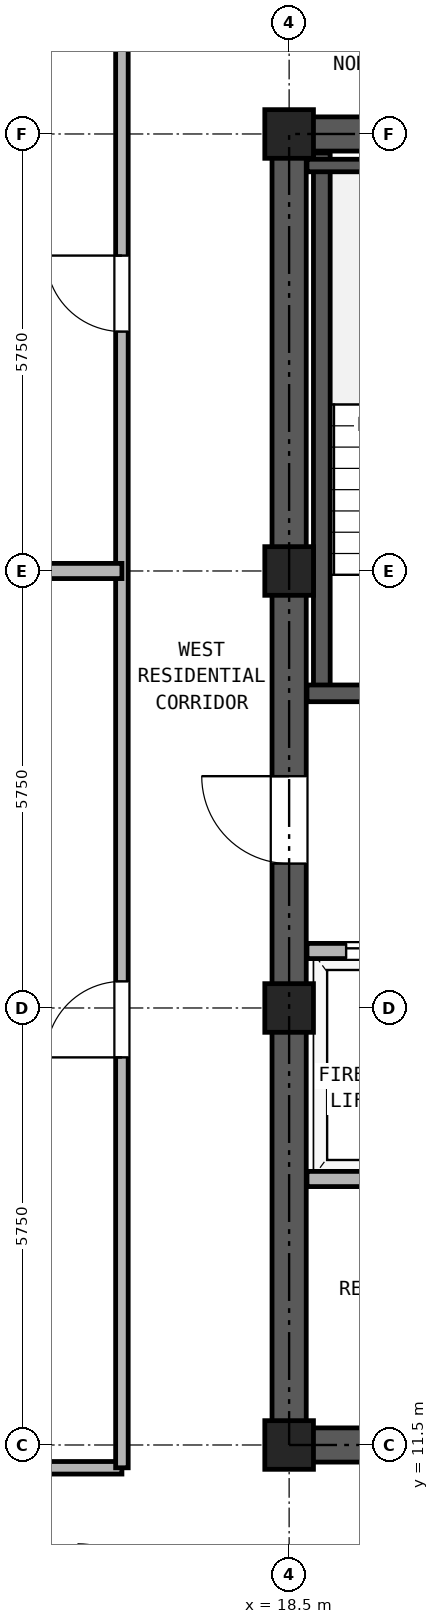
"""IFC4 building model, lengths in metres.
Left out: names, types, materials, properties, quantities, classifications, styles, units other than length and angle.
Written with IfcOpenShell. Run it as: python <this file> out.ifc"""

import sys

from ifc_helpers import new_model, si_unit, direction, frame, frame_2d, origin, origin_2d, place, context, subcontext, project, spatial, rectangle, hollow_rectangle, extrude, source, transform, mapped, element, fill, save


model = new_model("IFC4")
c1 = context("Model", 3, precision=1e-05, world=origin(), true_north=direction((0.0, 1.0)))
c2 = subcontext(c1, "Body", "Model", "MODEL_VIEW")
j1 = project(units=[si_unit("LENGTHUNIT", "METRE"), si_unit("PLANEANGLEUNIT", "RADIAN")], contexts=[c1])
p1 = place(None, origin())
s1 = spatial("IfcSite", under=j1, at=p1, CompositionType="ELEMENT")
p2 = place(p1, origin())
s2 = spatial("IfcBuilding", under=s1, at=p2, CompositionType="ELEMENT")
p3 = place(p2, frame((0.0, 0.0, 184.9)))
s3 = spatial("IfcBuildingStorey", under=s2, at=p3, CompositionType="ELEMENT", Elevation=184.9)
m1 = source(origin(), c2, "Body", "SweptSolid", [
    extrude(hollow_rectangle(XDim=0.64, YDim=0.64, WallThickness=0.035, at=origin_2d()), origin(), (0.0, 0.0, 1.0), 2.84),
])
for number, where, z_axis, x_axis in (
    (1, (18.5, 11.5, 0.0), (0.0, 0.0, 1.0), (1.0, 0.0, 0.0)),
    (2, (18.5, 17.25, 0.0), (0.0, 0.0, 1.0), (1.0, 0.0, 0.0)),
    (3, (18.5, 23.0, 0.0), (0.0, 0.0, 1.0), (1.0, 0.0, 0.0)),
    (4, (18.5, 28.75, 0.0), (0.0, 0.0, 1.0), (1.0, 0.0, 0.0)),
):
    element("IfcColumn", number, at=place(p3, frame(where, z_axis=z_axis, x_axis=x_axis)), inside=s3, PredefinedType="COLUMN", context=c2, shape_type="MappedRepresentation", body=[
        mapped(m1, transform((0.0, 0.0, 0.0), x_axis=(1.0, 0.0, 0.0), y_axis=(0.0, 1.0, 0.0), z_axis=(0.0, 0.0, 1.0), scale=1.0)),
    ])
p4 = place(p3, frame((18.275, 11.5, 0.0), z_axis=(0.0, 0.0, 1.0), x_axis=(1.0, 0.0, 0.0)))
e5 = element("IfcWall", 5, at=p4, inside=s3, PredefinedType="SHEAR", context=c2, shape_type="SweptSolid", body=[
    extrude(rectangle(XDim=10.45, YDim=0.45, at=frame_2d((5.225, 0.0))), origin(), (0.0, 0.0, 1.0), 2.84),
])
p5 = place(p4, frame((1.825, 0.0, 0.0)))
e6 = element("IfcOpeningElement", 6, at=p5, cuts=e5, PredefinedType="OPENING", context=c2, shape_type="SweptSolid", body=[
    extrude(rectangle(XDim=0.95, YDim=2.15, at=frame_2d((0.475, 1.075))), frame((0.0, 0.235, 0.0), z_axis=(0.0, -1.0, 0.0), x_axis=(1.0, 0.0, 0.0)), (0.0, 0.0, 1.0), 0.47),
])
p6 = place(p4, frame((5.325, 0.0, 0.0)))
e7 = element("IfcOpeningElement", 7, at=p6, cuts=e5, PredefinedType="OPENING", context=c2, shape_type="SweptSolid", body=[
    extrude(rectangle(XDim=0.95, YDim=2.15, at=frame_2d((0.475, 1.075))), frame((0.0, 0.235, 0.0), z_axis=(0.0, -1.0, 0.0), x_axis=(1.0, 0.0, 0.0)), (0.0, 0.0, 1.0), 0.47),
])
p7 = place(p4, frame((8.225, 0.0, 0.0)))
e8 = element("IfcOpeningElement", 8, at=p7, cuts=e5, PredefinedType="OPENING", context=c2, shape_type="SweptSolid", body=[
    extrude(rectangle(XDim=1.1, YDim=2.25, at=frame_2d((0.55, 1.125))), frame((0.0, 0.235, 0.0), z_axis=(0.0, -1.0, 0.0), x_axis=(1.0, 0.0, 0.0)), (0.0, 0.0, 1.0), 0.47),
])
p8 = place(p3, frame((18.275, 28.75, 0.0), z_axis=(0.0, 0.0, 1.0), x_axis=(1.0, 0.0, 0.0)))
e9 = element("IfcWall", 9, at=p8, inside=s3, PredefinedType="SHEAR", context=c2, shape_type="SweptSolid", body=[
    extrude(rectangle(XDim=10.45, YDim=0.45, at=frame_2d((5.225, 0.0))), origin(), (0.0, 0.0, 1.0), 2.84),
])
p9 = place(p8, frame((4.105, 0.0, 0.0)))
e10 = element("IfcOpeningElement", 10, at=p9, cuts=e9, PredefinedType="OPENING", context=c2, shape_type="SweptSolid", body=[
    extrude(rectangle(XDim=0.9, YDim=2.05, at=frame_2d((0.45, 1.025))), frame((0.0, 0.235, 0.0), z_axis=(0.0, -1.0, 0.0), x_axis=(1.0, 0.0, 0.0)), (0.0, 0.0, 1.0), 0.47),
])
p10 = place(p8, frame((5.645, 0.0, 0.0)))
e11 = element("IfcOpeningElement", 11, at=p10, cuts=e9, PredefinedType="OPENING", context=c2, shape_type="SweptSolid", body=[
    extrude(rectangle(XDim=0.9, YDim=2.05, at=frame_2d((0.45, 1.025))), frame((0.0, 0.235, 0.0), z_axis=(0.0, -1.0, 0.0), x_axis=(1.0, 0.0, 0.0)), (0.0, 0.0, 1.0), 0.47),
])
p11 = place(p3, frame((18.5, 11.725, 0.0), z_axis=(0.0, 0.0, 1.0), x_axis=(0.0, 1.0, 0.0)))
e12 = element("IfcWall", 12, at=p11, inside=s3, PredefinedType="SHEAR", context=c2, shape_type="SweptSolid", body=[
    extrude(rectangle(XDim=16.8, YDim=0.45, at=frame_2d((8.4, 0.0))), origin(), (0.0, 0.0, 1.0), 2.84),
])
p12 = place(p11, frame((7.425, 0.0, 0.0)))
e13 = element("IfcOpeningElement", 13, at=p12, cuts=e12, PredefinedType="OPENING", context=c2, shape_type="SweptSolid", body=[
    extrude(rectangle(XDim=1.15, YDim=2.2, at=frame_2d((0.575, 1.1))), frame((0.0, 0.235, 0.0), z_axis=(0.0, -1.0, 0.0), x_axis=(1.0, 0.0, 0.0)), (0.0, 0.0, 1.0), 0.47),
])
p13 = place(p3, frame((18.93, 21.39, 0.0), z_axis=(0.0, 0.0, 1.0), x_axis=(0.0, 1.0, 0.0)))
e14 = element("IfcWall", 14, at=p13, inside=s3, PredefinedType="SOLIDWALL", context=c2, shape_type="SweptSolid", body=[
    extrude(rectangle(XDim=7.11, YDim=0.22, at=frame_2d((3.555, 0.0))), origin(), (0.0, 0.0, 1.0), 2.84),
])
p14 = place(p3, frame((18.735, 28.335, 0.0), z_axis=(0.0, 0.0, 1.0), x_axis=(1.0, 0.0, 0.0)))
e15 = element("IfcWall", 15, at=p14, inside=s3, PredefinedType="PARTITIONING", context=c2, shape_type="SweptSolid", body=[
    extrude(rectangle(XDim=3.375, YDim=0.165, at=frame_2d((1.688, 0.0))), origin(), (0.0, 0.0, 1.0), 2.84),
])
p15 = place(p3, frame((18.735, 21.39, 0.0), z_axis=(0.0, 0.0, 1.0), x_axis=(1.0, 0.0, 0.0)))
e16 = element("IfcWall", 16, at=p15, inside=s3, PredefinedType="SOLIDWALL", context=c2, shape_type="SweptSolid", body=[
    extrude(rectangle(XDim=6.395, YDim=0.22, at=frame_2d((3.197, 0.0))), origin(), (0.0, 0.0, 1.0), 2.84),
])
p16 = place(p15, frame((1.115, 0.0, 0.0)))
e17 = element("IfcOpeningElement", 17, at=p16, cuts=e16, PredefinedType="OPENING", context=c2, shape_type="SweptSolid", body=[
    extrude(rectangle(XDim=1.15, YDim=2.2, at=frame_2d((0.575, 1.1))), frame((0.0, 0.12, 0.0), z_axis=(0.0, -1.0, 0.0), x_axis=(1.0, 0.0, 0.0)), (0.0, 0.0, 1.0), 0.24),
])
p17 = place(p15, frame((4.845, 0.0, 0.0)))
e18 = element("IfcOpeningElement", 18, at=p17, cuts=e16, PredefinedType="OPENING", context=c2, shape_type="SweptSolid", body=[
    extrude(rectangle(XDim=1.1, YDim=2.25, at=frame_2d((0.55, 1.125))), frame((0.0, 0.12, 0.0), z_axis=(0.0, -1.0, 0.0), x_axis=(1.0, 0.0, 0.0)), (0.0, 0.0, 1.0), 0.24),
])
p18 = place(p3, frame((18.735, 18.0, 0.0), z_axis=(0.0, 0.0, 1.0), x_axis=(1.0, 0.0, 0.0)))
e19 = element("IfcWall", 19, at=p18, inside=s3, PredefinedType="PARTITIONING", context=c2, shape_type="SweptSolid", body=[
    extrude(rectangle(XDim=9.53, YDim=0.2, at=frame_2d((4.765, 0.0))), origin(), (0.0, 0.0, 1.0), 2.84),
])
p19 = place(p18, frame((0.515, 0.0, 0.0)))
e20 = element("IfcOpeningElement", 20, at=p19, cuts=e19, PredefinedType="OPENING", context=c2, shape_type="SweptSolid", body=[
    extrude(rectangle(XDim=1.3, YDim=2.3, at=frame_2d((0.65, 1.15))), frame((0.0, 0.11, 0.0), z_axis=(0.0, -1.0, 0.0), x_axis=(1.0, 0.0, 0.0)), (0.0, 0.0, 1.0), 0.22),
])
p20 = place(p18, frame((2.615, 0.0, 0.0)))
e21 = element("IfcOpeningElement", 21, at=p20, cuts=e19, PredefinedType="OPENING", context=c2, shape_type="SweptSolid", body=[
    extrude(rectangle(XDim=1.3, YDim=2.3, at=frame_2d((0.65, 1.15))), frame((0.0, 0.11, 0.0), z_axis=(0.0, -1.0, 0.0), x_axis=(1.0, 0.0, 0.0)), (0.0, 0.0, 1.0), 0.22),
])
p21 = place(p18, frame((7.115, 0.0, 0.0)))
e22 = element("IfcOpeningElement", 22, at=p21, cuts=e19, PredefinedType="OPENING", context=c2, shape_type="SweptSolid", body=[
    extrude(rectangle(XDim=1.0, YDim=2.15, at=frame_2d((0.5, 1.075))), frame((0.0, 0.11, 0.0), z_axis=(0.0, -1.0, 0.0), x_axis=(1.0, 0.0, 0.0)), (0.0, 0.0, 1.0), 0.22),
])
p22 = place(p3, frame((18.735, 15.0, 0.0), z_axis=(0.0, 0.0, 1.0), x_axis=(1.0, 0.0, 0.0)))
e23 = element("IfcWall", 23, at=p22, inside=s3, PredefinedType="PARTITIONING", context=c2, shape_type="SweptSolid", body=[
    extrude(rectangle(XDim=9.53, YDim=0.2, at=frame_2d((4.765, 0.0))), origin(), (0.0, 0.0, 1.0), 2.84),
])
p23 = place(p3, frame((7.6, 11.2, 0.0), z_axis=(0.0, 0.0, 1.0), x_axis=(1.0, 0.0, 0.0)))
e24 = element("IfcWall", 24, at=p23, inside=s3, PredefinedType="PARTITIONING", context=c2, shape_type="SweptSolid", body=[
    extrude(rectangle(XDim=8.7, YDim=0.165, at=frame_2d((4.35, 0.0))), origin(), (0.0, 0.0, 1.0), 2.84),
])
p24 = place(p3, frame((16.3, 11.2, 0.0), z_axis=(0.0, 0.0, 1.0), x_axis=(0.0, 1.0, 0.0)))
e25 = element("IfcWall", 25, at=p24, inside=s3, PredefinedType="PARTITIONING", context=c2, shape_type="SweptSolid", body=[
    extrude(rectangle(XDim=23.94, YDim=0.165, at=frame_2d((11.97, 0.0))), origin(), (0.0, 0.0, 1.0), 2.84),
])
p25 = place(p24, frame((5.4, 0.0, 0.0)))
e26 = element("IfcOpeningElement", 26, at=p25, cuts=e25, PredefinedType="OPENING", context=c2, shape_type="SweptSolid", body=[
    extrude(rectangle(XDim=1.0, YDim=2.15, at=frame_2d((0.5, 1.075))), frame((0.0, 0.093, 0.0), z_axis=(0.0, -1.0, 0.0), x_axis=(1.0, 0.0, 0.0)), (0.0, 0.0, 1.0), 0.185),
])
p26 = place(p24, frame((14.95, 0.0, 0.0)))
e27 = element("IfcOpeningElement", 27, at=p26, cuts=e25, PredefinedType="OPENING", context=c2, shape_type="SweptSolid", body=[
    extrude(rectangle(XDim=1.0, YDim=2.15, at=frame_2d((0.5, 1.075))), frame((0.0, 0.093, 0.0), z_axis=(0.0, -1.0, 0.0), x_axis=(1.0, 0.0, 0.0)), (0.0, 0.0, 1.0), 0.185),
])
p27 = place(p3, frame((0.16, 23.0, 0.0), z_axis=(0.0, 0.0, 1.0), x_axis=(1.0, 0.0, 0.0)))
e28 = element("IfcWall", 28, at=p27, inside=s3, PredefinedType="PARTITIONING", context=c2, shape_type="SweptSolid", body=[
    extrude(rectangle(XDim=16.14, YDim=0.2, at=frame_2d((8.07, 0.0))), origin(), (0.0, 0.0, 1.0), 2.213),
])
p28 = place(p19, origin())
e29 = element("IfcDoor", 29, at=p28, inside=s3, OperationType="DOUBLE_DOOR_SLIDING", PredefinedType="DOOR", context=c2, shape_type="SweptSolid", body=[
    extrude(rectangle(XDim=1.3, YDim=2.3, at=frame_2d((0.65, 1.15))), frame((0.0, 0.025, 0.0), z_axis=(0.0, -1.0, 0.0), x_axis=(1.0, 0.0, 0.0)), (0.0, 0.0, 1.0), 0.05),
])
fill(e20, e29)
p29 = place(p12, frame((1.15, 0.0, 0.0), z_axis=(0.0, 0.0, 1.0), x_axis=(-1.0, 0.0, 0.0)))
e30 = element("IfcDoor", 30, at=p29, inside=s3, OperationType="SINGLE_SWING_RIGHT", PredefinedType="DOOR", context=c2, shape_type="SweptSolid", body=[
    extrude(rectangle(XDim=1.15, YDim=2.2, at=frame_2d((0.575, 1.1))), frame((0.0, 0.025, 0.0), z_axis=(0.0, -1.0, 0.0), x_axis=(1.0, 0.0, 0.0)), (0.0, 0.0, 1.0), 0.05),
])
fill(e13, e30)
p30 = place(p25, origin())
e31 = element("IfcDoor", 31, at=p30, inside=s3, OperationType="SINGLE_SWING_LEFT", PredefinedType="DOOR", context=c2, shape_type="SweptSolid", body=[
    extrude(rectangle(XDim=1.0, YDim=2.15, at=frame_2d((0.5, 1.075))), frame((0.0, 0.025, 0.0), z_axis=(0.0, -1.0, 0.0), x_axis=(1.0, 0.0, 0.0)), (0.0, 0.0, 1.0), 0.05),
])
fill(e26, e31)
p31 = place(p26, origin())
e32 = element("IfcDoor", 32, at=p31, inside=s3, OperationType="SINGLE_SWING_RIGHT", PredefinedType="DOOR", context=c2, shape_type="SweptSolid", body=[
    extrude(rectangle(XDim=1.0, YDim=2.15, at=frame_2d((0.5, 1.075))), frame((0.0, 0.025, 0.0), z_axis=(0.0, -1.0, 0.0), x_axis=(1.0, 0.0, 0.0)), (0.0, 0.0, 1.0), 0.05),
])
fill(e27, e32)
save(model, sys.argv[1])
